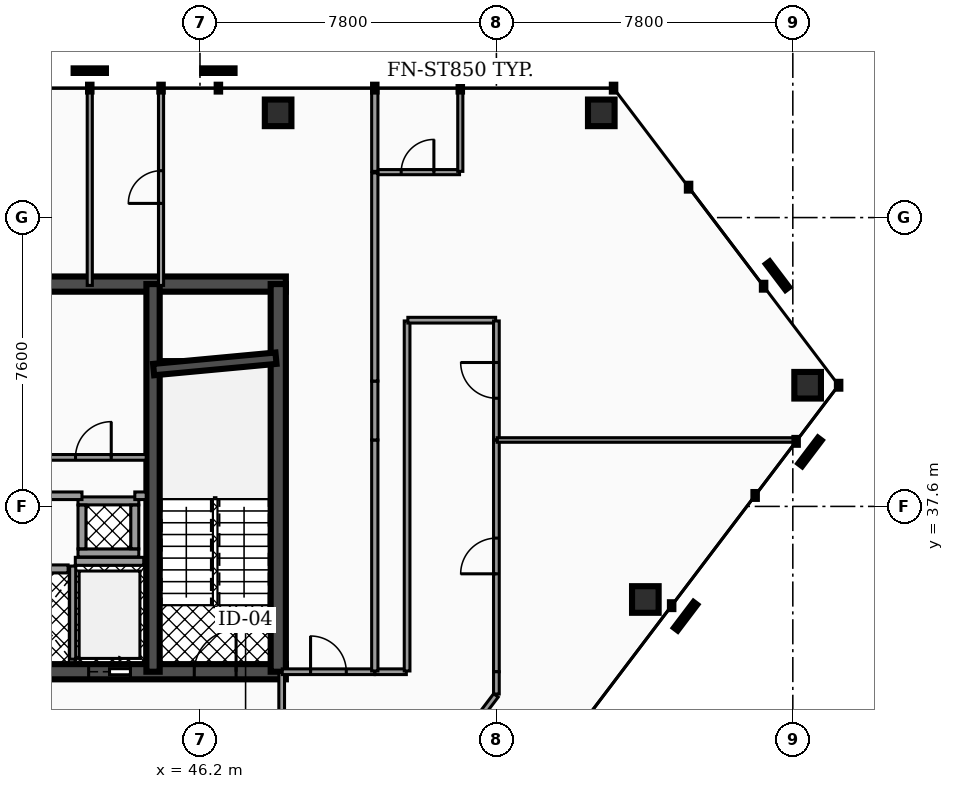
"""IFC4 building model, lengths in metres.
Left out: names, types, materials, properties, quantities, classifications, styles, units other than length and angle.
Written with IfcOpenShell. Run it as: python <this file> out.ifc"""

import sys

from ifc_helpers import new_model, si_unit, direction, frame, frame_2d, origin, origin_2d, place, context, subcontext, project, spatial, rectangle, hollow_rectangle, extrude, element, fill, save


model = new_model("IFC4")
c1 = context("Model", 3, precision=1e-05, world=origin(), true_north=direction((0.0, 1.0)))
c2 = subcontext(c1, "Body", "Model", "MODEL_VIEW")
j1 = project(units=[si_unit("LENGTHUNIT", "METRE"), si_unit("PLANEANGLEUNIT", "RADIAN")], contexts=[c1])
p1 = place(None, origin())
s1 = spatial("IfcSite", under=j1, at=p1, CompositionType="ELEMENT")
p2 = place(p1, origin())
s2 = spatial("IfcBuilding", under=s1, at=p2, CompositionType="ELEMENT")
p3 = place(p2, frame((0.0, 0.0, 190.74)))
s3 = spatial("IfcBuildingStorey", under=s2, at=p3, CompositionType="ELEMENT", Elevation=190.74)
p4 = place(p3, frame((28.4, 43.45, 0.0), z_axis=(0.0, 0.0, 1.0), x_axis=(1.0, 0.0, 0.0)))
e1 = element("IfcWall", 1, at=p4, inside=s3, PredefinedType="SHEAR", context=c2, shape_type="SweptSolid", body=[
    extrude(rectangle(XDim=20.06, YDim=0.4, at=frame_2d((10.03, 0.0))), origin(), (0.0, 0.0, 1.0), 3.39),
])
p5 = place(p3, frame((28.4, 33.25, 0.0), z_axis=(0.0, 0.0, 1.0), x_axis=(1.0, 0.0, 0.0)))
e2 = element("IfcWall", 2, at=p5, inside=s3, PredefinedType="SHEAR", context=c2, shape_type="SweptSolid", body=[
    extrude(rectangle(XDim=20.06, YDim=0.4, at=frame_2d((10.03, 0.0))), origin(), (0.0, 0.0, 1.0), 3.39),
])
p6 = place(p5, frame((4.03, 0.0, 0.0)))
e3 = element("IfcOpeningElement", 3, at=p6, cuts=e2, PredefinedType="OPENING", context=c2, shape_type="SweptSolid", body=[
    extrude(rectangle(XDim=1.1, YDim=2.15, at=frame_2d((0.55, 1.075))), frame((0.0, 0.21, 0.0), z_axis=(0.0, -1.0, 0.0), x_axis=(1.0, 0.0, 0.0)), (0.0, 0.0, 1.0), 0.42),
])
p7 = place(p5, frame((14.87, 0.0, 0.0)))
e4 = element("IfcOpeningElement", 4, at=p7, cuts=e2, PredefinedType="OPENING", context=c2, shape_type="SweptSolid", body=[
    extrude(rectangle(XDim=1.1, YDim=2.15, at=frame_2d((0.55, 1.075))), frame((0.0, 0.21, 0.0), z_axis=(0.0, -1.0, 0.0), x_axis=(1.0, 0.0, 0.0)), (0.0, 0.0, 1.0), 0.42),
])
p8 = place(p5, frame((5.95, 0.0, 0.0)))
e5 = element("IfcOpeningElement", 5, at=p8, cuts=e2, PredefinedType="OPENING", context=c2, shape_type="SweptSolid", body=[
    extrude(rectangle(XDim=1.0, YDim=2.1, at=frame_2d((0.5, 1.05))), frame((0.0, 0.21, 0.0), z_axis=(0.0, -1.0, 0.0), x_axis=(1.0, 0.0, 0.0)), (0.0, 0.0, 1.0), 0.42),
])
p9 = place(p5, frame((7.65, 0.0, 0.0)))
e6 = element("IfcOpeningElement", 6, at=p9, cuts=e2, PredefinedType="OPENING", context=c2, shape_type="SweptSolid", body=[
    extrude(rectangle(XDim=1.0, YDim=2.1, at=frame_2d((0.5, 1.05))), frame((0.0, 0.21, 0.0), z_axis=(0.0, -1.0, 0.0), x_axis=(1.0, 0.0, 0.0)), (0.0, 0.0, 1.0), 0.42),
])
p10 = place(p5, frame((1.31, 0.0, 0.0)))
e7 = element("IfcOpeningElement", 7, at=p10, cuts=e2, PredefinedType="OPENING", context=c2, shape_type="SweptSolid", body=[
    extrude(rectangle(XDim=1.1, YDim=2.2, at=frame_2d((0.55, 1.1))), frame((0.0, 0.21, 0.0), z_axis=(0.0, -1.0, 0.0), x_axis=(1.0, 0.0, 0.0)), (0.0, 0.0, 1.0), 0.42),
])
p11 = place(p5, frame((9.44, 0.0, 0.0)))
e8 = element("IfcOpeningElement", 8, at=p11, cuts=e2, PredefinedType="OPENING", context=c2, shape_type="SweptSolid", body=[
    extrude(rectangle(XDim=1.12, YDim=2.05, at=frame_2d((0.56, 1.025))), frame((0.0, 0.21, 0.0), z_axis=(0.0, -1.0, 0.0), x_axis=(1.0, 0.0, 0.0)), (0.0, 0.0, 1.0), 0.42),
])
p12 = place(p5, frame((17.65, 0.0, 0.0)))
e9 = element("IfcOpeningElement", 9, at=p12, cuts=e2, PredefinedType="OPENING", context=c2, shape_type="SweptSolid", body=[
    extrude(rectangle(XDim=1.1, YDim=2.2, at=frame_2d((0.55, 1.1))), frame((0.0, 0.21, 0.0), z_axis=(0.0, -1.0, 0.0), x_axis=(1.0, 0.0, 0.0)), (0.0, 0.0, 1.0), 0.42),
])
p13 = place(p3, frame((44.965, 33.25, 0.0), z_axis=(0.0, 0.0, 1.0), x_axis=(0.0, 1.0, 0.0)))
e10 = element("IfcWall", 10, at=p13, inside=s3, PredefinedType="SHEAR", context=c2, shape_type="SweptSolid", body=[
    extrude(rectangle(XDim=10.2, YDim=0.35, at=frame_2d((5.1, 0.0))), origin(), (0.0, 0.0, 1.0), 3.39),
])
p14 = place(p3, frame((48.26, 33.25, 0.0), z_axis=(0.0, 0.0, 1.0), x_axis=(0.0, 1.0, 0.0)))
e11 = element("IfcWall", 11, at=p14, inside=s3, PredefinedType="SHEAR", context=c2, shape_type="SweptSolid", body=[
    extrude(rectangle(XDim=10.2, YDim=0.4, at=frame_2d((5.1, 0.0))), origin(), (0.0, 0.0, 1.0), 3.39),
])
p15 = place(p3, frame((44.98, 41.2, 0.0), z_axis=(0.0, 0.0, 1.0), x_axis=(0.995686468965, 0.09278176286, 0.0)))
e12 = element("IfcWall", 12, at=p15, inside=s3, PredefinedType="SHEAR", context=c2, shape_type="SweptSolid", body=[
    extrude(rectangle(XDim=3.234, YDim=0.3, at=frame_2d((1.617, 0.0))), origin(), (0.0, 0.0, 1.0), 3.39),
])
p16 = place(p3, frame((56.76, 47.956, 0.0), z_axis=(0.04351950699, -0.022874716071, 0.998790668697), x_axis=(0.465263955127, 0.885171990101, 0.0)))
e13 = element("IfcColumn", 13, at=p16, inside=s3, PredefinedType="COLUMN", context=c2, shape_type="SweptSolid", body=[
    extrude(hollow_rectangle(XDim=0.7, YDim=0.7, WallThickness=0.035, at=origin_2d()), origin(), (0.0, 0.0, 1.0), 3.394),
])
p17 = place(p3, frame((48.256, 47.956, 0.0), z_axis=(0.018429198571, -0.0228925201, 0.999568055294), x_axis=(0.778953317427, 0.627081915916, 0.0)))
e14 = element("IfcColumn", 14, at=p17, inside=s3, PredefinedType="COLUMN", context=c2, shape_type="SweptSolid", body=[
    extrude(hollow_rectangle(XDim=0.7, YDim=0.7, WallThickness=0.035, at=origin_2d()), origin(), (0.0, 0.0, 1.0), 3.391),
])
p18 = place(p3, frame((57.919, 35.151, 0.0), z_axis=(-0.043781484286, 0.070265693633, 0.996567064443), x_axis=(-0.848728060466, -0.528829537165, 0.0)))
e15 = element("IfcColumn", 15, at=p18, inside=s3, PredefinedType="COLUMN", context=c2, shape_type="SweptSolid", body=[
    extrude(hollow_rectangle(XDim=0.7, YDim=0.7, WallThickness=0.035, at=origin_2d()), origin(), (0.0, 0.0, 1.0), 3.402),
])
p19 = place(p3, frame((62.19, 40.788, 0.0), z_axis=(-0.035438037838, 0.081206191968, 0.996067116142), x_axis=(-0.916528585644, -0.399969188435, 0.0)))
e16 = element("IfcColumn", 16, at=p19, inside=s3, PredefinedType="COLUMN", context=c2, shape_type="SweptSolid", body=[
    extrude(hollow_rectangle(XDim=0.7, YDim=0.7, WallThickness=0.035, at=origin_2d()), origin(), (0.0, 0.0, 1.0), 3.403),
])
p20 = place(p3, frame((42.92, 36.155, 0.0), z_axis=(0.0, 0.0, 1.0), x_axis=(1.0, 0.0, 0.0)))
e17 = element("IfcWall", 17, at=p20, inside=s3, PredefinedType="SOLIDWALL", context=c2, shape_type="SweptSolid", body=[
    extrude(rectangle(XDim=1.8, YDim=0.21, at=frame_2d((0.9, 0.0))), origin(), (0.0, 0.0, 1.0), 3.39),
])
p21 = place(p3, frame((42.85, 33.58, 0.0), z_axis=(0.0, 0.0, 1.0), x_axis=(0.0, 1.0, 0.0)))
e18 = element("IfcWall", 18, at=p21, inside=s3, PredefinedType="SOLIDWALL", context=c2, shape_type="SweptSolid", body=[
    extrude(rectangle(XDim=2.45, YDim=0.16, at=frame_2d((1.225, 0.0))), origin(), (0.0, 0.0, 1.0), 3.39),
])
p22 = place(p3, frame((41.17, 35.955, 0.0), z_axis=(0.0, 0.0, 1.0), x_axis=(1.0, 0.0, 0.0)))
e19 = element("IfcWall", 19, at=p22, inside=s3, PredefinedType="SOLIDWALL", context=c2, shape_type="SweptSolid", body=[
    extrude(rectangle(XDim=1.56, YDim=0.21, at=frame_2d((0.78, 0.0))), origin(), (0.0, 0.0, 1.0), 3.39),
])
for number, where, z_axis, x_axis in (
    (20, (42.99, 36.375, 0.0), (0.0, 0.0, 1.0), (1.0, 0.0, 0.0)),
    (21, (42.99, 37.745, 0.0), (0.0, 0.0, 1.0), (1.0, 0.0, 0.0)),
):
    element("IfcWall", number, at=place(p3, frame(where, z_axis=z_axis, x_axis=x_axis)), inside=s3, PredefinedType="SOLIDWALL", context=c2, shape_type="SweptSolid", body=[
        extrude(rectangle(XDim=1.6, YDim=0.21, at=frame_2d((0.8, 0.0))), origin(), (0.0, 0.0, 1.0), 3.39),
    ])
for number, where, z_axis, x_axis in (
    (22, (43.095, 36.485, 0.0), (0.0, 0.0, 1.0), (0.0, 1.0, 0.0)),
    (23, (44.485, 36.485, 0.0), (0.0, 0.0, 1.0), (0.0, 1.0, 0.0)),
):
    element("IfcWall", number, at=place(p3, frame(where, z_axis=z_axis, x_axis=x_axis)), inside=s3, PredefinedType="SOLIDWALL", context=c2, shape_type="SweptSolid", body=[
        extrude(rectangle(XDim=1.15, YDim=0.21, at=frame_2d((0.575, 0.0))), origin(), (0.0, 0.0, 1.0), 3.39),
    ])
p23 = place(p3, frame((42.005, 38.89, 0.0), z_axis=(0.0, 0.0, 1.0), x_axis=(1.0, 0.0, 0.0)))
e24 = element("IfcWall", 24, at=p23, inside=s3, PredefinedType="PARTITIONING", context=c2, shape_type="SweptSolid", body=[
    extrude(rectangle(XDim=2.78, YDim=0.15, at=frame_2d((1.39, 0.0))), origin(), (0.0, 0.0, 1.0), 2.347),
])
p24 = place(p23, frame((0.92, 0.0, 0.0)))
e25 = element("IfcOpeningElement", 25, at=p24, cuts=e24, PredefinedType="OPENING", context=c2, shape_type="SweptSolid", body=[
    extrude(rectangle(XDim=0.94, YDim=2.05, at=frame_2d((0.47, 1.025))), frame((0.0, 0.085, 0.0), z_axis=(0.0, -1.0, 0.0), x_axis=(1.0, 0.0, 0.0)), (0.0, 0.0, 1.0), 0.17),
])
p25 = place(p3, frame((39.27, 37.88, 0.0), z_axis=(0.0, 0.0, 1.0), x_axis=(1.0, 0.0, 0.0)))
e26 = element("IfcWall", 26, at=p25, inside=s3, PredefinedType="PARTITIONING", context=c2, shape_type="SweptSolid", body=[
    extrude(rectangle(XDim=3.825, YDim=0.2, at=frame_2d((1.913, 0.0))), origin(), (0.0, 0.0, 1.0), 2.347),
])
p26 = place(p3, frame((44.485, 37.88, 0.0), z_axis=(0.0, 0.0, 1.0), x_axis=(1.0, 0.0, 0.0)))
e27 = element("IfcWall", 27, at=p26, inside=s3, PredefinedType="PARTITIONING", context=c2, shape_type="SweptSolid", body=[
    extrude(rectangle(XDim=0.3, YDim=0.2, at=frame_2d((0.15, 0.0))), origin(), (0.0, 0.0, 1.0), 2.347),
])
p27 = place(p3, frame((48.35, 30.17, 0.0), z_axis=(0.0, 0.0, 1.0), x_axis=(0.0, 1.0, 0.0)))
e28 = element("IfcWall", 28, at=p27, inside=s3, PredefinedType="PARTITIONING", context=c2, shape_type="SweptSolid", body=[
    extrude(rectangle(XDim=3.06, YDim=0.15, at=frame_2d((1.53, 0.0))), origin(), (0.0, 0.0, 1.0), 2.347),
])
p28 = place(p27, frame((1.06, 0.0, 0.0)))
e29 = element("IfcOpeningElement", 29, at=p28, cuts=e28, PredefinedType="OPENING", context=c2, shape_type="SweptSolid", body=[
    extrude(rectangle(XDim=0.94, YDim=2.05, at=frame_2d((0.47, 1.025))), frame((0.0, 0.085, 0.0), z_axis=(0.0, -1.0, 0.0), x_axis=(1.0, 0.0, 0.0)), (0.0, 0.0, 1.0), 0.17),
])
p29 = place(p3, frame((54.0, 33.25, 0.0), z_axis=(0.0, 0.0, 1.0), x_axis=(0.0, 1.0, 0.0)))
e30 = element("IfcWall", 30, at=p29, inside=s3, PredefinedType="PARTITIONING", context=c2, shape_type="SweptSolid", body=[
    extrude(rectangle(XDim=6.093, YDim=0.15, at=frame_2d((3.046, 0.0))), origin(), (0.0, 0.0, 1.0), 2.347),
])
p30 = place(p29, frame((2.576, 0.0, 0.0)))
e31 = element("IfcOpeningElement", 31, at=p30, cuts=e30, PredefinedType="OPENING", context=c2, shape_type="SweptSolid", body=[
    extrude(rectangle(XDim=0.94, YDim=2.05, at=frame_2d((0.47, 1.025))), frame((0.0, 0.085, 0.0), z_axis=(0.0, -1.0, 0.0), x_axis=(1.0, 0.0, 0.0)), (0.0, 0.0, 1.0), 0.17),
])
p31 = place(p3, frame((54.0, 32.664, 0.0), z_axis=(0.0, 0.0, 1.0), x_axis=(0.0, 1.0, 0.0)))
e32 = element("IfcWall", 32, at=p31, inside=s3, PredefinedType="PARTITIONING", context=c2, shape_type="SweptSolid", body=[
    extrude(rectangle(XDim=0.586, YDim=0.15, at=frame_2d((0.293, 0.0))), origin(), (0.0, 0.0, 1.0), 2.347),
])
p32 = place(p3, frame((52.114, 30.154, 0.0), z_axis=(0.0, 0.0, 1.0), x_axis=(0.603819819336, 0.797120835116, 0.0)))
e33 = element("IfcWall", 33, at=p32, inside=s3, PredefinedType="PARTITIONING", context=c2, shape_type="SweptSolid", body=[
    extrude(rectangle(XDim=3.103, YDim=0.15, at=frame_2d((1.552, 0.0))), origin(), (0.0, 0.0, 1.0), 2.347),
])
p33 = place(p3, frame((50.805, 33.25, 0.0), z_axis=(0.0, 0.0, 1.0), x_axis=(1.0, 0.0, 0.0)))
e34 = element("IfcWall", 34, at=p33, inside=s3, PredefinedType="PARTITIONING", context=c2, shape_type="SweptSolid", body=[
    extrude(rectangle(XDim=0.825, YDim=0.15, at=frame_2d((0.413, 0.0))), origin(), (0.0, 0.0, 1.0), 2.347),
])
p34 = place(p3, frame((51.65, 33.27, 0.0), z_axis=(0.0, 0.0, 1.0), x_axis=(0.0, 1.0, 0.0)))
e35 = element("IfcWall", 35, at=p34, inside=s3, PredefinedType="PARTITIONING", context=c2, shape_type="SweptSolid", body=[
    extrude(rectangle(XDim=9.21, YDim=0.15, at=frame_2d((4.605, 0.0))), origin(), (0.0, 0.0, 1.0), 2.347),
])
p35 = place(p3, frame((51.67, 42.5, 0.0), z_axis=(0.0, 0.0, 1.0), x_axis=(1.0, 0.0, 0.0)))
e36 = element("IfcWall", 36, at=p35, inside=s3, PredefinedType="PARTITIONING", context=c2, shape_type="SweptSolid", body=[
    extrude(rectangle(XDim=2.31, YDim=0.15, at=frame_2d((1.155, 0.0))), origin(), (0.0, 0.0, 1.0), 2.347),
])
p36 = place(p3, frame((54.0, 39.353, 0.0), z_axis=(0.0, 0.0, 1.0), x_axis=(0.0, 1.0, 0.0)))
e37 = element("IfcWall", 37, at=p36, inside=s3, PredefinedType="PARTITIONING", context=c2, shape_type="SweptSolid", body=[
    extrude(rectangle(XDim=3.127, YDim=0.15, at=frame_2d((1.563, 0.0))), origin(), (0.0, 0.0, 1.0), 2.347),
])
p37 = place(p36, frame((1.094, 0.0, 0.0)))
e38 = element("IfcOpeningElement", 38, at=p37, cuts=e37, PredefinedType="OPENING", context=c2, shape_type="SweptSolid", body=[
    extrude(rectangle(XDim=0.94, YDim=2.05, at=frame_2d((0.47, 1.025))), frame((0.0, 0.085, 0.0), z_axis=(0.0, -1.0, 0.0), x_axis=(1.0, 0.0, 0.0)), (0.0, 0.0, 1.0), 0.17),
])
p38 = place(p3, frame((48.365, 33.25, 0.0), z_axis=(0.0, 0.0, 1.0), x_axis=(1.0, 0.0, 0.0)))
e39 = element("IfcWall", 39, at=p38, inside=s3, PredefinedType="PARTITIONING", context=c2, shape_type="SweptSolid", body=[
    extrude(rectangle(XDim=2.43, YDim=0.15, at=frame_2d((1.215, 0.0))), origin(), (0.0, 0.0, 1.0), 2.347),
])
p39 = place(p38, frame((0.745, 0.0, 0.0)))
e40 = element("IfcOpeningElement", 40, at=p39, cuts=e39, PredefinedType="OPENING", context=c2, shape_type="SweptSolid", body=[
    extrude(rectangle(XDim=0.94, YDim=2.05, at=frame_2d((0.47, 1.025))), frame((0.0, 0.085, 0.0), z_axis=(0.0, -1.0, 0.0), x_axis=(1.0, 0.0, 0.0)), (0.0, 0.0, 1.0), 0.17),
])
p40 = place(p3, frame((43.3, 43.415, 0.0), z_axis=(0.0, 0.0, 1.0), x_axis=(0.0, 1.0, 0.0)))
e41 = element("IfcWall", 41, at=p40, inside=s3, PredefinedType="PARTITIONING", context=c2, shape_type="SweptSolid", body=[
    extrude(rectangle(XDim=5.176, YDim=0.135, at=frame_2d((2.588, 0.0))), origin(), (0.0, 0.0, 1.0), 2.347),
])
p41 = place(p3, frame((54.02, 39.348, 0.0), z_axis=(0.0, 0.0, 1.0), x_axis=(1.0, 0.0, 0.0)))
e42 = element("IfcWall", 42, at=p41, inside=s3, PredefinedType="PARTITIONING", context=c2, shape_type="SweptSolid", body=[
    extrude(rectangle(XDim=7.879, YDim=0.12, at=frame_2d((3.94, 0.0))), origin(), (0.0, 0.0, 1.0), 2.347),
])
p42 = place(p3, frame((50.82, 46.396, 0.0), z_axis=(0.0, 0.0, 1.0), x_axis=(1.0, 0.0, 0.0)))
e43 = element("IfcWall", 43, at=p42, inside=s3, PredefinedType="PARTITIONING", context=c2, shape_type="SweptSolid", body=[
    extrude(rectangle(XDim=2.21, YDim=0.135, at=frame_2d((1.105, 0.0))), origin(), (0.0, 0.0, 1.0), 2.347),
])
p43 = place(p42, frame((0.675, 0.0, 0.0)))
e44 = element("IfcOpeningElement", 44, at=p43, cuts=e43, PredefinedType="OPENING", context=c2, shape_type="SweptSolid", body=[
    extrude(rectangle(XDim=0.86, YDim=2.05, at=frame_2d((0.43, 1.025))), frame((0.0, 0.077, 0.0), z_axis=(0.0, -1.0, 0.0), x_axis=(1.0, 0.0, 0.0)), (0.0, 0.0, 1.0), 0.155),
])
p44 = place(p3, frame((53.05, 46.416, 0.0), z_axis=(0.0, 0.0, 1.0), x_axis=(0.0, 1.0, 0.0)))
e45 = element("IfcWall", 45, at=p44, inside=s3, PredefinedType="PARTITIONING", context=c2, shape_type="SweptSolid", body=[
    extrude(rectangle(XDim=2.175, YDim=0.135, at=frame_2d((1.087, 0.0))), origin(), (0.0, 0.0, 1.0), 2.347),
])
p45 = place(p3, frame((50.8, 33.27, 0.0), z_axis=(0.0, 0.0, 1.0), x_axis=(0.0, 1.0, 0.0)))
e46 = element("IfcWall", 46, at=p45, inside=s3, PredefinedType="PARTITIONING", context=c2, shape_type="SweptSolid", body=[
    extrude(rectangle(XDim=6.078, YDim=0.165, at=frame_2d((3.039, 0.0))), origin(), (0.0, 0.0, 1.0), 2.347),
])
p46 = place(p3, frame((50.8, 39.348, 0.0), z_axis=(0.0, 0.0, 1.0), x_axis=(0.0, 1.0, 0.0)))
e47 = element("IfcWall", 47, at=p46, inside=s3, PredefinedType="PARTITIONING", context=c2, shape_type="SweptSolid", body=[
    extrude(rectangle(XDim=1.55, YDim=0.165, at=frame_2d((0.775, 0.0))), origin(), (0.0, 0.0, 1.0), 2.347),
])
p47 = place(p3, frame((50.8, 40.898, 0.0), z_axis=(0.0, 0.0, 1.0), x_axis=(0.0, 1.0, 0.0)))
e48 = element("IfcWall", 48, at=p47, inside=s3, PredefinedType="PARTITIONING", context=c2, shape_type="SweptSolid", body=[
    extrude(rectangle(XDim=5.478, YDim=0.165, at=frame_2d((2.739, 0.0))), origin(), (0.0, 0.0, 1.0), 2.347),
])
p48 = place(p3, frame((50.8, 46.416, 0.0), z_axis=(0.0, 0.0, 1.0), x_axis=(0.0, 1.0, 0.0)))
e49 = element("IfcWall", 49, at=p48, inside=s3, PredefinedType="PARTITIONING", context=c2, shape_type="SweptSolid", body=[
    extrude(rectangle(XDim=2.175, YDim=0.165, at=frame_2d((1.087, 0.0))), origin(), (0.0, 0.0, 1.0), 2.347),
])
p49 = place(p3, frame((45.175, 43.415, 0.0), z_axis=(0.0, 0.0, 1.0), x_axis=(0.0, 1.0, 0.0)))
e50 = element("IfcWall", 50, at=p49, inside=s3, PredefinedType="PARTITIONING", context=c2, shape_type="SweptSolid", body=[
    extrude(rectangle(XDim=5.176, YDim=0.135, at=frame_2d((2.588, 0.0))), origin(), (0.0, 0.0, 1.0), 2.347),
])
p50 = place(p49, frame((2.158, 0.0, 0.0)))
e51 = element("IfcOpeningElement", 51, at=p50, cuts=e50, PredefinedType="OPENING", context=c2, shape_type="SweptSolid", body=[
    extrude(rectangle(XDim=0.86, YDim=2.05, at=frame_2d((0.43, 1.025))), frame((0.0, 0.077, 0.0), z_axis=(0.0, -1.0, 0.0), x_axis=(1.0, 0.0, 0.0)), (0.0, 0.0, 1.0), 0.155),
])
p51 = place(p7, origin())
e52 = element("IfcDoor", 52, at=p51, inside=s3, OperationType="SLIDING_TO_RIGHT", PredefinedType="DOOR", context=c2, shape_type="SweptSolid", body=[
    extrude(rectangle(XDim=1.1, YDim=2.15, at=frame_2d((0.55, 1.075))), frame((0.0, 0.025, 0.0), z_axis=(0.0, -1.0, 0.0), x_axis=(1.0, 0.0, 0.0)), (0.0, 0.0, 1.0), 0.05),
])
fill(e4, e52)
p52 = place(p12, origin())
e53 = element("IfcDoor", 53, at=p52, inside=s3, OperationType="SINGLE_SWING_RIGHT", PredefinedType="DOOR", context=c2, shape_type="SweptSolid", body=[
    extrude(rectangle(XDim=1.1, YDim=2.2, at=frame_2d((0.55, 1.1))), frame((0.0, 0.025, 0.0), z_axis=(0.0, -1.0, 0.0), x_axis=(1.0, 0.0, 0.0)), (0.0, 0.0, 1.0), 0.05),
])
fill(e9, e53)
p53 = place(p24, origin())
e54 = element("IfcDoor", 54, at=p53, inside=s3, OperationType="SINGLE_SWING_RIGHT", PredefinedType="DOOR", context=c2, shape_type="SweptSolid", body=[
    extrude(rectangle(XDim=0.94, YDim=2.05, at=frame_2d((0.47, 1.025))), frame((0.0, 0.025, 0.0), z_axis=(0.0, -1.0, 0.0), x_axis=(1.0, 0.0, 0.0)), (0.0, 0.0, 1.0), 0.05),
])
fill(e25, e54)
p54 = place(p30, origin())
e55 = element("IfcDoor", 55, at=p54, inside=s3, OperationType="SINGLE_SWING_LEFT", PredefinedType="DOOR", context=c2, shape_type="SweptSolid", body=[
    extrude(rectangle(XDim=0.94, YDim=2.05, at=frame_2d((0.47, 1.025))), frame((0.0, 0.025, 0.0), z_axis=(0.0, -1.0, 0.0), x_axis=(1.0, 0.0, 0.0)), (0.0, 0.0, 1.0), 0.05),
])
fill(e31, e55)
p55 = place(p37, origin())
e56 = element("IfcDoor", 56, at=p55, inside=s3, OperationType="SINGLE_SWING_RIGHT", PredefinedType="DOOR", context=c2, shape_type="SweptSolid", body=[
    extrude(rectangle(XDim=0.94, YDim=2.05, at=frame_2d((0.47, 1.025))), frame((0.0, 0.025, 0.0), z_axis=(0.0, -1.0, 0.0), x_axis=(1.0, 0.0, 0.0)), (0.0, 0.0, 1.0), 0.05),
])
fill(e38, e56)
p56 = place(p39, origin())
e57 = element("IfcDoor", 57, at=p56, inside=s3, OperationType="SINGLE_SWING_LEFT", PredefinedType="DOOR", context=c2, shape_type="SweptSolid", body=[
    extrude(rectangle(XDim=0.94, YDim=2.05, at=frame_2d((0.47, 1.025))), frame((0.0, 0.025, 0.0), z_axis=(0.0, -1.0, 0.0), x_axis=(1.0, 0.0, 0.0)), (0.0, 0.0, 1.0), 0.05),
])
fill(e40, e57)
p57 = place(p43, origin())
e58 = element("IfcDoor", 58, at=p57, inside=s3, OperationType="SINGLE_SWING_RIGHT", PredefinedType="DOOR", context=c2, shape_type="SweptSolid", body=[
    extrude(rectangle(XDim=0.86, YDim=2.05, at=frame_2d((0.43, 1.025))), frame((0.0, 0.025, 0.0), z_axis=(0.0, -1.0, 0.0), x_axis=(1.0, 0.0, 0.0)), (0.0, 0.0, 1.0), 0.05),
])
fill(e44, e58)
p58 = place(p50, origin())
e59 = element("IfcDoor", 59, at=p58, inside=s3, OperationType="SINGLE_SWING_LEFT", PredefinedType="DOOR", context=c2, shape_type="SweptSolid", body=[
    extrude(rectangle(XDim=0.86, YDim=2.05, at=frame_2d((0.43, 1.025))), frame((0.0, 0.025, 0.0), z_axis=(0.0, -1.0, 0.0), x_axis=(1.0, 0.0, 0.0)), (0.0, 0.0, 1.0), 0.05),
])
fill(e51, e59)
save(model, sys.argv[1])
